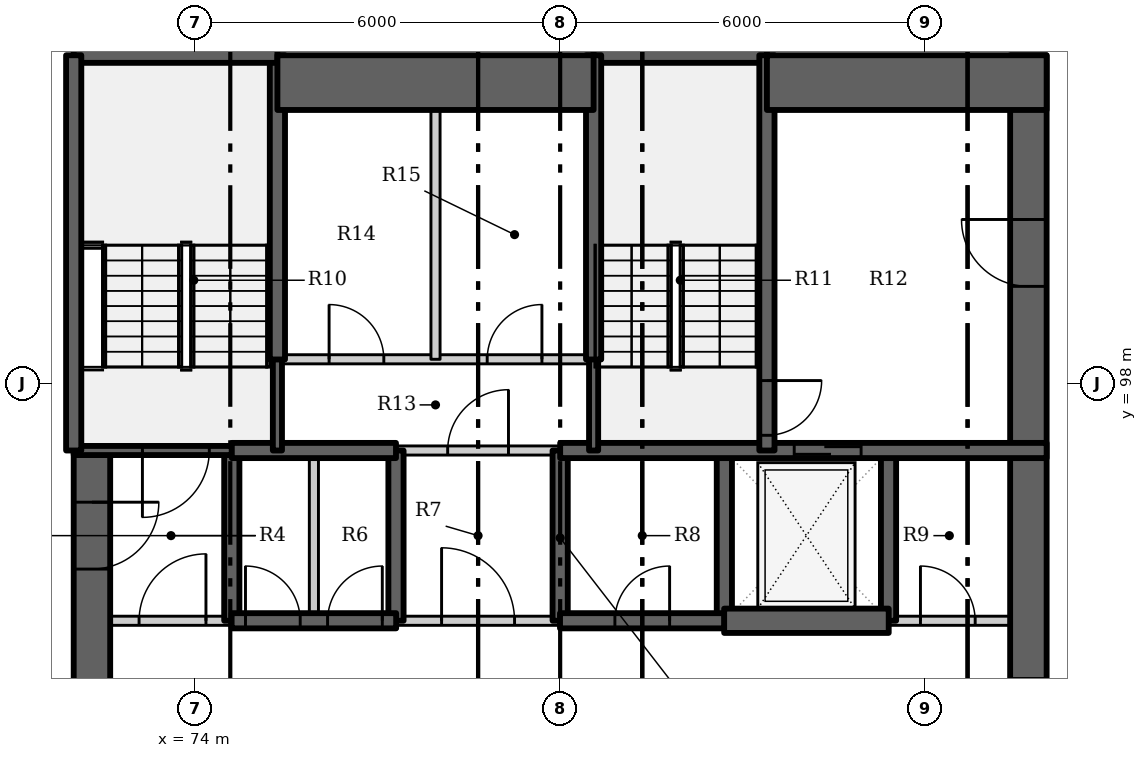
"""IFC4 building model, lengths in metres.
Left out: names, types, materials, properties, quantities, classifications, styles, units other than length and angle.
Written with IfcOpenShell. Run it as: python <this file> out.ifc"""

import sys

from ifc_helpers import new_model, si_unit, direction, frame, frame_2d, origin, place, context, subcontext, project, spatial, rectangle, extrude, element, fill, save


model = new_model("IFC4")
c1 = context("Model", 3, precision=1e-05, world=origin(), true_north=direction((0.0, 1.0)))
c2 = subcontext(c1, "Body", "Model", "MODEL_VIEW")
j1 = project(units=[si_unit("LENGTHUNIT", "METRE"), si_unit("PLANEANGLEUNIT", "RADIAN")], contexts=[c1])
p1 = place(None, origin())
s1 = spatial("IfcSite", under=j1, at=p1, CompositionType="ELEMENT")
p2 = place(p1, origin())
s2 = spatial("IfcBuilding", under=s1, at=p2, CompositionType="ELEMENT")
p3 = place(p2, origin())
s3 = spatial("IfcBuildingStorey", under=s2, at=p3, CompositionType="ELEMENT", Elevation=0.0)
p4 = place(p3, frame((74.6, 94.1, -1.8), z_axis=(0.0, 0.0, 1.0), x_axis=(0.0, 1.0, 0.0)))
e1 = element("IfcWall", 1, at=p4, inside=s3, PredefinedType="SHEAR", context=c2, shape_type="SweptSolid", body=[
    extrude(rectangle(XDim=2.8, YDim=0.25, at=frame_2d((1.4, 0.0))), origin(), (0.0, 0.0, 1.0), 8.1),
])
p5 = place(p3, frame((72.3, 96.9, -1.8), z_axis=(0.0, 0.0, 1.0), x_axis=(0.0, -1.0, 0.0)))
e2 = element("IfcWall", 2, at=p5, inside=s3, PredefinedType="SHEAR", context=c2, shape_type="SweptSolid", body=[
    extrude(rectangle(XDim=9.1, YDim=0.6, at=frame_2d((4.55, 0.0))), origin(), (0.0, 0.0, 1.0), 8.1),
])
p6 = place(p5, frame((0.85, 0.0, 1.8)))
e3 = element("IfcOpeningElement", 3, at=p6, cuts=e2, PredefinedType="OPENING", context=c2, shape_type="SweptSolid", body=[
    extrude(rectangle(XDim=1.1, YDim=2.1, at=frame_2d((0.55, 1.05))), frame((0.0, 0.31, 0.0), z_axis=(0.0, -1.0, 0.0), x_axis=(1.0, 0.0, 0.0)), (0.0, 0.0, 1.0), 0.62),
])
for number, where, z_axis, x_axis in (
    (4, (77.3, 94.1, -1.8), (0.0, 0.0, 1.0), (0.0, 1.0, 0.0)),
    (5, (80.0, 94.1, -1.8), (0.0, 0.0, 1.0), (0.0, 1.0, 0.0)),
    (6, (82.7, 94.1, -1.8), (0.0, 0.0, 1.0), (0.0, 1.0, 0.0)),
    (7, (85.4, 94.1, -1.8), (0.0, 0.0, 1.0), (0.0, 1.0, 0.0)),
):
    element("IfcWall", number, at=place(p3, frame(where, z_axis=z_axis, x_axis=x_axis)), inside=s3, PredefinedType="SHEAR", context=c2, shape_type="SweptSolid", body=[
        extrude(rectangle(XDim=2.8, YDim=0.25, at=frame_2d((1.4, 0.0))), origin(), (0.0, 0.0, 1.0), 8.1),
    ])
p7 = place(p3, frame((87.7, 87.8, -1.8), z_axis=(0.0, 0.0, 1.0), x_axis=(0.0, 1.0, 0.0)))
e8 = element("IfcWall", 8, at=p7, inside=s3, PredefinedType="SHEAR", context=c2, shape_type="SweptSolid", body=[
    extrude(rectangle(XDim=15.6, YDim=0.6, at=frame_2d((7.8, 0.0))), origin(), (0.0, 0.0, 1.0), 8.1),
])
p8 = place(p7, frame((3.85, 0.0, 1.8)))
e9 = element("IfcOpeningElement", 9, at=p8, cuts=e8, PredefinedType="OPENING", context=c2, shape_type="SweptSolid", body=[
    extrude(rectangle(XDim=1.5, YDim=2.1, at=frame_2d((0.75, 1.05))), frame((0.0, 0.31, 0.0), z_axis=(0.0, -1.0, 0.0), x_axis=(1.0, 0.0, 0.0)), (0.0, 0.0, 1.0), 0.62),
])
p9 = place(p7, frame((11.799, 0.0, 1.8)))
e10 = element("IfcOpeningElement", 10, at=p9, cuts=e8, PredefinedType="OPENING", context=c2, shape_type="SweptSolid", body=[
    extrude(rectangle(XDim=1.1, YDim=2.1, at=frame_2d((0.55, 1.05))), frame((0.0, 0.31, 0.0), z_axis=(0.0, -1.0, 0.0), x_axis=(1.0, 0.0, 0.0)), (0.0, 0.0, 1.0), 0.62),
])
p10 = place(p3, frame((72.0, 94.1, 0.0), z_axis=(0.0, 0.0, 1.0), x_axis=(1.0, 0.0, 0.0)))
e11 = element("IfcWall", 11, at=p10, inside=s3, PredefinedType="PARTITIONING", context=c2, shape_type="SweptSolid", body=[
    extrude(rectangle(XDim=2.603, YDim=0.15, at=frame_2d((1.302, 0.0))), origin(), (0.0, 0.0, 1.0), 6.3),
])
p11 = place(p10, frame((1.075, 0.0, 0.0)))
e12 = element("IfcOpeningElement", 12, at=p11, cuts=e11, PredefinedType="OPENING", context=c2, shape_type="SweptSolid", body=[
    extrude(rectangle(XDim=1.1, YDim=2.1, at=frame_2d((0.55, 1.05))), frame((0.0, 0.085, 0.0), z_axis=(0.0, -1.0, 0.0), x_axis=(1.0, 0.0, 0.0)), (0.0, 0.0, 1.0), 0.17),
])
p12 = place(p3, frame((77.297, 94.1, 0.0), z_axis=(0.0, 0.0, 1.0), x_axis=(1.0, 0.0, 0.0)))
e13 = element("IfcWall", 13, at=p12, inside=s3, PredefinedType="PARTITIONING", context=c2, shape_type="SweptSolid", body=[
    extrude(rectangle(XDim=2.706, YDim=0.15, at=frame_2d((1.353, 0.0))), origin(), (0.0, 0.0, 1.0), 6.3),
])
p13 = place(p12, frame((0.753, 0.0, 0.0)))
e14 = element("IfcOpeningElement", 14, at=p13, cuts=e13, PredefinedType="OPENING", context=c2, shape_type="SweptSolid", body=[
    extrude(rectangle(XDim=1.2, YDim=2.1, at=frame_2d((0.6, 1.05))), frame((0.0, 0.085, 0.0), z_axis=(0.0, -1.0, 0.0), x_axis=(1.0, 0.0, 0.0)), (0.0, 0.0, 1.0), 0.17),
])
p14 = place(p3, frame((85.397, 94.1, 0.0), z_axis=(0.0, 0.0, 1.0), x_axis=(1.0, 0.0, 0.0)))
e15 = element("IfcWall", 15, at=p14, inside=s3, PredefinedType="PARTITIONING", context=c2, shape_type="SweptSolid", body=[
    extrude(rectangle(XDim=2.603, YDim=0.15, at=frame_2d((1.302, 0.0))), origin(), (0.0, 0.0, 1.0), 6.3),
])
p15 = place(p14, frame((0.528, 0.0, 0.0)))
e16 = element("IfcOpeningElement", 16, at=p15, cuts=e15, PredefinedType="OPENING", context=c2, shape_type="SweptSolid", body=[
    extrude(rectangle(XDim=0.9, YDim=2.1, at=frame_2d((0.45, 1.05))), frame((0.0, 0.085, 0.0), z_axis=(0.0, -1.0, 0.0), x_axis=(1.0, 0.0, 0.0)), (0.0, 0.0, 1.0), 0.17),
])
p16 = place(p3, frame((74.597, 94.1, -1.8), z_axis=(0.0, 0.0, 1.0), x_axis=(1.0, 0.0, 0.0)))
e17 = element("IfcWall", 17, at=p16, inside=s3, PredefinedType="SHEAR", context=c2, shape_type="SweptSolid", body=[
    extrude(rectangle(XDim=2.706, YDim=0.25, at=frame_2d((1.353, 0.0))), origin(), (0.0, 0.0, 1.0), 8.1),
])
p17 = place(p16, frame((0.228, 0.0, 1.8)))
e18 = element("IfcOpeningElement", 18, at=p17, cuts=e17, PredefinedType="OPENING", context=c2, shape_type="SweptSolid", body=[
    extrude(rectangle(XDim=0.9, YDim=2.1, at=frame_2d((0.45, 1.05))), frame((0.0, 0.135, 0.0), z_axis=(0.0, -1.0, 0.0), x_axis=(1.0, 0.0, 0.0)), (0.0, 0.0, 1.0), 0.27),
])
p18 = place(p16, frame((1.578, 0.0, 1.8)))
e19 = element("IfcOpeningElement", 19, at=p18, cuts=e17, PredefinedType="OPENING", context=c2, shape_type="SweptSolid", body=[
    extrude(rectangle(XDim=0.9, YDim=2.1, at=frame_2d((0.45, 1.05))), frame((0.0, 0.135, 0.0), z_axis=(0.0, -1.0, 0.0), x_axis=(1.0, 0.0, 0.0)), (0.0, 0.0, 1.0), 0.27),
])
p19 = place(p3, frame((79.997, 94.1, -1.8), z_axis=(0.0, 0.0, 1.0), x_axis=(1.0, 0.0, 0.0)))
e20 = element("IfcWall", 20, at=p19, inside=s3, PredefinedType="SHEAR", context=c2, shape_type="SweptSolid", body=[
    extrude(rectangle(XDim=2.706, YDim=0.25, at=frame_2d((1.353, 0.0))), origin(), (0.0, 0.0, 1.0), 8.1),
])
p20 = place(p19, frame((0.903, 0.0, 1.8)))
e21 = element("IfcOpeningElement", 21, at=p20, cuts=e20, PredefinedType="OPENING", context=c2, shape_type="SweptSolid", body=[
    extrude(rectangle(XDim=0.9, YDim=2.1, at=frame_2d((0.45, 1.05))), frame((0.0, 0.135, 0.0), z_axis=(0.0, -1.0, 0.0), x_axis=(1.0, 0.0, 0.0)), (0.0, 0.0, 1.0), 0.27),
])
p21 = place(p3, frame((82.697, 94.1, -1.8), z_axis=(0.0, 0.0, 1.0), x_axis=(1.0, 0.0, 0.0)))
e22 = element("IfcWall", 22, at=p21, inside=s3, PredefinedType="SHEAR", context=c2, shape_type="SweptSolid", body=[
    extrude(rectangle(XDim=2.706, YDim=0.4, at=frame_2d((1.353, 0.0))), origin(), (0.0, 0.0, 1.0), 8.1),
])
p22 = place(p3, frame((74.6, 96.9, -1.8), z_axis=(0.0, 0.0, 1.0), x_axis=(-1.0, 0.0, 0.0)))
e23 = element("IfcWall", 23, at=p22, inside=s3, PredefinedType="SHEAR", context=c2, shape_type="SweptSolid", body=[
    extrude(rectangle(XDim=2.6, YDim=0.15, at=frame_2d((1.3, 0.0))), origin(), (0.0, 0.0, 1.0), 8.1),
])
p23 = place(p22, frame((0.37, 0.0, 1.8)))
e24 = element("IfcOpeningElement", 24, at=p23, cuts=e23, PredefinedType="OPENING", context=c2, shape_type="SweptSolid", body=[
    extrude(rectangle(XDim=1.1, YDim=2.1, at=frame_2d((0.55, 1.05))), frame((0.0, 0.085, 0.0), z_axis=(0.0, -1.0, 0.0), x_axis=(1.0, 0.0, 0.0)), (0.0, 0.0, 1.0), 0.17),
])
p24 = place(p3, frame((75.95, 94.1, 0.0), z_axis=(0.0, 0.0, 1.0), x_axis=(0.0, 1.0, 0.0)))
e25 = element("IfcWall", 25, at=p24, inside=s3, PredefinedType="PARTITIONING", context=c2, shape_type="SweptSolid", body=[
    extrude(rectangle(XDim=2.8, YDim=0.15, at=frame_2d((1.4, 0.0))), origin(), (0.0, 0.0, 1.0), 6.3),
])
p25 = place(p3, frame((74.6, 96.9, -1.8), z_axis=(0.0, 0.0, 1.0), x_axis=(1.0, 0.0, 0.0)))
e26 = element("IfcWall", 26, at=p25, inside=s3, PredefinedType="SHEAR", context=c2, shape_type="SweptSolid", body=[
    extrude(rectangle(XDim=2.7, YDim=0.25, at=frame_2d((1.35, 0.0))), origin(), (0.0, 0.0, 1.0), 8.1),
])
p26 = place(p3, frame((80.0, 96.9, -1.8), z_axis=(0.0, 0.0, 1.0), x_axis=(1.0, 0.0, 0.0)))
e27 = element("IfcWall", 27, at=p26, inside=s3, PredefinedType="SHEAR", context=c2, shape_type="SweptSolid", body=[
    extrude(rectangle(XDim=8.0, YDim=0.25, at=frame_2d((4.0, 0.0))), origin(), (0.0, 0.0, 1.0), 8.1),
])
p27 = place(p26, frame((3.849, 0.0, 1.8)))
e28 = element("IfcOpeningElement", 28, at=p27, cuts=e27, PredefinedType="OPENING", context=c2, shape_type="SweptSolid", body=[
    extrude(rectangle(XDim=1.1, YDim=2.1, at=frame_2d((0.55, 1.05))), frame((0.0, 0.135, 0.0), z_axis=(0.0, -1.0, 0.0), x_axis=(1.0, 0.0, 0.0)), (0.0, 0.0, 1.0), 0.27),
])
p28 = place(p3, frame((77.3, 96.9, 0.0), z_axis=(0.0, 0.0, 1.0), x_axis=(1.0, 0.0, 0.0)))
e29 = element("IfcWall", 29, at=p28, inside=s3, PredefinedType="PARTITIONING", context=c2, shape_type="SweptSolid", body=[
    extrude(rectangle(XDim=2.7, YDim=0.15, at=frame_2d((1.35, 0.0))), origin(), (0.0, 0.0, 1.0), 6.3),
])
p29 = place(p28, frame((0.85, 0.0, 0.0)))
e30 = element("IfcOpeningElement", 30, at=p29, cuts=e29, PredefinedType="OPENING", context=c2, shape_type="SweptSolid", body=[
    extrude(rectangle(XDim=1.0, YDim=2.1, at=frame_2d((0.5, 1.05))), frame((0.0, 0.085, 0.0), z_axis=(0.0, -1.0, 0.0), x_axis=(1.0, 0.0, 0.0)), (0.0, 0.0, 1.0), 0.17),
])
p30 = place(p3, frame((75.35, 96.9, -1.8), z_axis=(0.0, 0.0, 1.0), x_axis=(0.0, 1.0, 0.0)))
e31 = element("IfcWall", 31, at=p30, inside=s3, PredefinedType="SHEAR", context=c2, shape_type="SweptSolid", body=[
    extrude(rectangle(XDim=1.503, YDim=0.15, at=frame_2d((0.751, 0.0))), origin(), (0.0, 0.0, 1.0), 8.1),
])
p31 = place(p3, frame((75.35, 98.397, -1.8), z_axis=(0.0, 0.0, 1.0), x_axis=(0.0, 1.0, 0.0)))
e32 = element("IfcWall", 32, at=p31, inside=s3, PredefinedType="SHEAR", context=c2, shape_type="SweptSolid", body=[
    extrude(rectangle(XDim=5.003, YDim=0.25, at=frame_2d((2.501, 0.0))), origin(), (0.0, 0.0, 1.0), 8.1),
])
p32 = place(p3, frame((72.0, 103.4, -1.8), z_axis=(0.0, 0.0, 1.0), x_axis=(1.0, 0.0, 0.0)))
e33 = element("IfcWall", 33, at=p32, inside=s3, PredefinedType="SHEAR", context=c2, shape_type="SweptSolid", body=[
    extrude(rectangle(XDim=3.35, YDim=0.25, at=frame_2d((1.675, 0.0))), origin(), (0.0, 0.0, 1.0), 8.1),
])
p33 = place(p3, frame((80.55, 103.4, -1.8), z_axis=(0.0, 0.0, 1.0), x_axis=(1.0, 0.0, 0.0)))
e34 = element("IfcWall", 34, at=p33, inside=s3, PredefinedType="SHEAR", context=c2, shape_type="SweptSolid", body=[
    extrude(rectangle(XDim=2.85, YDim=0.25, at=frame_2d((1.425, 0.0))), origin(), (0.0, 0.0, 1.0), 8.1),
])
p34 = place(p3, frame((72.0, 96.9, -1.8), z_axis=(0.0, 0.0, 1.0), x_axis=(0.0, 1.0, 0.0)))
e35 = element("IfcWall", 35, at=p34, inside=s3, PredefinedType="SHEAR", context=c2, shape_type="SweptSolid", body=[
    extrude(rectangle(XDim=6.5, YDim=0.25, at=frame_2d((3.25, 0.0))), origin(), (0.0, 0.0, 1.0), 8.1),
])
p35 = place(p3, frame((83.4, 103.4, -1.8), z_axis=(0.0, 0.0, 1.0), x_axis=(0.0, -1.0, 0.0)))
e36 = element("IfcWall", 36, at=p35, inside=s3, PredefinedType="SHEAR", context=c2, shape_type="SweptSolid", body=[
    extrude(rectangle(XDim=6.5, YDim=0.25, at=frame_2d((3.25, 0.0))), origin(), (0.0, 0.0, 1.0), 8.1),
])
p36 = place(p35, frame((5.35, 0.0, 1.8)))
e37 = element("IfcOpeningElement", 37, at=p36, cuts=e36, PredefinedType="OPENING", context=c2, shape_type="SweptSolid", body=[
    extrude(rectangle(XDim=0.9, YDim=2.1, at=frame_2d((0.45, 1.05))), frame((0.0, 0.135, 0.0), z_axis=(0.0, -1.0, 0.0), x_axis=(1.0, 0.0, 0.0)), (0.0, 0.0, 1.0), 0.27),
])
p37 = place(p3, frame((80.55, 96.9, -1.8), z_axis=(0.0, 0.0, 1.0), x_axis=(0.0, 1.0, 0.0)))
e38 = element("IfcWall", 38, at=p37, inside=s3, PredefinedType="SHEAR", context=c2, shape_type="SweptSolid", body=[
    extrude(rectangle(XDim=1.503, YDim=0.15, at=frame_2d((0.751, 0.0))), origin(), (0.0, 0.0, 1.0), 8.1),
])
p38 = place(p3, frame((80.55, 98.397, -1.8), z_axis=(0.0, 0.0, 1.0), x_axis=(0.0, 1.0, 0.0)))
e39 = element("IfcWall", 39, at=p38, inside=s3, PredefinedType="SHEAR", context=c2, shape_type="SweptSolid", body=[
    extrude(rectangle(XDim=5.003, YDim=0.25, at=frame_2d((2.501, 0.0))), origin(), (0.0, 0.0, 1.0), 8.1),
])
p39 = place(p3, frame((75.35, 102.95, -1.8), z_axis=(0.0, 0.0, 1.0), x_axis=(1.0, 0.0, 0.0)))
e40 = element("IfcWall", 40, at=p39, inside=s3, PredefinedType="SHEAR", context=c2, shape_type="SweptSolid", body=[
    extrude(rectangle(XDim=5.2, YDim=0.9, at=frame_2d((2.6, 0.0))), origin(), (0.0, 0.0, 1.0), 8.1),
])
p40 = place(p3, frame((83.4, 102.95, -1.8), z_axis=(0.0, 0.0, 1.0), x_axis=(1.0, 0.0, 0.0)))
e41 = element("IfcWall", 41, at=p40, inside=s3, PredefinedType="SHEAR", context=c2, shape_type="SweptSolid", body=[
    extrude(rectangle(XDim=4.6, YDim=0.9, at=frame_2d((2.3, 0.0))), origin(), (0.0, 0.0, 1.0), 8.1),
])
p41 = place(p3, frame((75.35, 98.4, 0.0), z_axis=(0.0, 0.0, 1.0), x_axis=(1.0, 0.0, 0.0)))
e42 = element("IfcWall", 42, at=p41, inside=s3, PredefinedType="PARTITIONING", context=c2, shape_type="SweptSolid", body=[
    extrude(rectangle(XDim=5.2, YDim=0.15, at=frame_2d((2.6, 0.0))), origin(), (0.0, 0.0, 1.0), 6.3),
])
p42 = place(p41, frame((0.85, 0.0, 0.0)))
e43 = element("IfcOpeningElement", 43, at=p42, cuts=e42, PredefinedType="OPENING", context=c2, shape_type="SweptSolid", body=[
    extrude(rectangle(XDim=0.9, YDim=2.1, at=frame_2d((0.45, 1.05))), frame((0.0, 0.085, 0.0), z_axis=(0.0, -1.0, 0.0), x_axis=(1.0, 0.0, 0.0)), (0.0, 0.0, 1.0), 0.17),
])
p43 = place(p41, frame((3.45, 0.0, 0.0)))
e44 = element("IfcOpeningElement", 44, at=p43, cuts=e42, PredefinedType="OPENING", context=c2, shape_type="SweptSolid", body=[
    extrude(rectangle(XDim=0.9, YDim=2.1, at=frame_2d((0.45, 1.05))), frame((0.0, 0.085, 0.0), z_axis=(0.0, -1.0, 0.0), x_axis=(1.0, 0.0, 0.0)), (0.0, 0.0, 1.0), 0.17),
])
p44 = place(p3, frame((77.95, 98.4, 0.0), z_axis=(0.0, 0.0, 1.0), x_axis=(0.0, 1.0, 0.0)))
e45 = element("IfcWall", 45, at=p44, inside=s3, PredefinedType="PARTITIONING", context=c2, shape_type="SweptSolid", body=[
    extrude(rectangle(XDim=5.0, YDim=0.15, at=frame_2d((2.5, 0.0))), origin(), (0.0, 0.0, 1.0), 6.3),
])
p45 = place(p11, origin())
e46 = element("IfcDoor", 46, at=p45, inside=s3, OperationType="SINGLE_SWING_RIGHT", PredefinedType="DOOR", context=c2, shape_type="SweptSolid", body=[
    extrude(rectangle(XDim=1.1, YDim=2.1, at=frame_2d((0.55, 1.05))), frame((0.0, 0.025, 0.0), z_axis=(0.0, -1.0, 0.0), x_axis=(1.0, 0.0, 0.0)), (0.0, 0.0, 1.0), 0.05),
])
fill(e12, e46)
p46 = place(p17, origin())
e47 = element("IfcDoor", 47, at=p46, inside=s3, OperationType="SINGLE_SWING_LEFT", PredefinedType="DOOR", context=c2, shape_type="SweptSolid", body=[
    extrude(rectangle(XDim=0.9, YDim=2.1, at=frame_2d((0.45, 1.05))), frame((0.0, 0.025, 0.0), z_axis=(0.0, -1.0, 0.0), x_axis=(1.0, 0.0, 0.0)), (0.0, 0.0, 1.0), 0.05),
])
fill(e18, e47)
p47 = place(p18, origin())
e48 = element("IfcDoor", 48, at=p47, inside=s3, OperationType="SINGLE_SWING_RIGHT", PredefinedType="DOOR", context=c2, shape_type="SweptSolid", body=[
    extrude(rectangle(XDim=0.9, YDim=2.1, at=frame_2d((0.45, 1.05))), frame((0.0, 0.025, 0.0), z_axis=(0.0, -1.0, 0.0), x_axis=(1.0, 0.0, 0.0)), (0.0, 0.0, 1.0), 0.05),
])
fill(e19, e48)
p48 = place(p13, origin())
e49 = element("IfcDoor", 49, at=p48, inside=s3, OperationType="DOUBLE_DOOR_SINGLE_SWING", PredefinedType="DOOR", context=c2, shape_type="SweptSolid", body=[
    extrude(rectangle(XDim=1.2, YDim=2.1, at=frame_2d((0.6, 1.05))), frame((0.0, 0.025, 0.0), z_axis=(0.0, -1.0, 0.0), x_axis=(1.0, 0.0, 0.0)), (0.0, 0.0, 1.0), 0.05),
])
fill(e14, e49)
p49 = place(p20, origin())
e50 = element("IfcDoor", 50, at=p49, inside=s3, OperationType="SINGLE_SWING_RIGHT", PredefinedType="DOOR", context=c2, shape_type="SweptSolid", body=[
    extrude(rectangle(XDim=0.9, YDim=2.1, at=frame_2d((0.45, 1.05))), frame((0.0, 0.025, 0.0), z_axis=(0.0, -1.0, 0.0), x_axis=(1.0, 0.0, 0.0)), (0.0, 0.0, 1.0), 0.05),
])
fill(e21, e50)
p50 = place(p27, origin())
e51 = element("IfcDoor", 51, at=p50, inside=s3, OperationType="SLIDING_TO_LEFT", PredefinedType="DOOR", context=c2, shape_type="SweptSolid", body=[
    extrude(rectangle(XDim=1.1, YDim=2.1, at=frame_2d((0.55, 1.05))), frame((0.0, 0.025, 0.0), z_axis=(0.0, -1.0, 0.0), x_axis=(1.0, 0.0, 0.0)), (0.0, 0.0, 1.0), 0.05),
])
fill(e28, e51)
p51 = place(p15, origin())
e52 = element("IfcDoor", 52, at=p51, inside=s3, OperationType="SINGLE_SWING_LEFT", PredefinedType="DOOR", context=c2, shape_type="SweptSolid", body=[
    extrude(rectangle(XDim=0.9, YDim=2.1, at=frame_2d((0.45, 1.05))), frame((0.0, 0.025, 0.0), z_axis=(0.0, -1.0, 0.0), x_axis=(1.0, 0.0, 0.0)), (0.0, 0.0, 1.0), 0.05),
])
fill(e16, e52)
p52 = place(p29, origin())
e53 = element("IfcDoor", 53, at=p52, inside=s3, OperationType="SINGLE_SWING_RIGHT", PredefinedType="DOOR", context=c2, shape_type="SweptSolid", body=[
    extrude(rectangle(XDim=1.0, YDim=2.1, at=frame_2d((0.5, 1.05))), frame((0.0, 0.025, 0.0), z_axis=(0.0, -1.0, 0.0), x_axis=(1.0, 0.0, 0.0)), (0.0, 0.0, 1.0), 0.05),
])
fill(e30, e53)
p53 = place(p42, origin())
e54 = element("IfcDoor", 54, at=p53, inside=s3, OperationType="SINGLE_SWING_LEFT", PredefinedType="DOOR", context=c2, shape_type="SweptSolid", body=[
    extrude(rectangle(XDim=0.9, YDim=2.1, at=frame_2d((0.45, 1.05))), frame((0.0, 0.025, 0.0), z_axis=(0.0, -1.0, 0.0), x_axis=(1.0, 0.0, 0.0)), (0.0, 0.0, 1.0), 0.05),
])
fill(e43, e54)
p54 = place(p43, origin())
e55 = element("IfcDoor", 55, at=p54, inside=s3, OperationType="SINGLE_SWING_RIGHT", PredefinedType="DOOR", context=c2, shape_type="SweptSolid", body=[
    extrude(rectangle(XDim=0.9, YDim=2.1, at=frame_2d((0.45, 1.05))), frame((0.0, 0.025, 0.0), z_axis=(0.0, -1.0, 0.0), x_axis=(1.0, 0.0, 0.0)), (0.0, 0.0, 1.0), 0.05),
])
fill(e44, e55)
p55 = place(p23, origin())
e56 = element("IfcDoor", 56, at=p55, inside=s3, OperationType="SINGLE_SWING_RIGHT", PredefinedType="DOOR", context=c2, shape_type="SweptSolid", body=[
    extrude(rectangle(XDim=1.1, YDim=2.1, at=frame_2d((0.55, 1.05))), frame((0.0, 0.025, 0.0), z_axis=(0.0, -1.0, 0.0), x_axis=(1.0, 0.0, 0.0)), (0.0, 0.0, 1.0), 0.05),
])
fill(e24, e56)
p56 = place(p36, origin())
e57 = element("IfcDoor", 57, at=p56, inside=s3, OperationType="SINGLE_SWING_LEFT", PredefinedType="DOOR", context=c2, shape_type="SweptSolid", body=[
    extrude(rectangle(XDim=0.9, YDim=2.1, at=frame_2d((0.45, 1.05))), frame((0.0, 0.025, 0.0), z_axis=(0.0, -1.0, 0.0), x_axis=(1.0, 0.0, 0.0)), (0.0, 0.0, 1.0), 0.05),
])
fill(e37, e57)
p57 = place(p6, origin())
e58 = element("IfcDoor", 58, at=p57, inside=s3, OperationType="SINGLE_SWING_LEFT", PredefinedType="DOOR", context=c2, shape_type="SweptSolid", body=[
    extrude(rectangle(XDim=1.1, YDim=2.1, at=frame_2d((0.55, 1.05))), frame((0.0, 0.025, 0.0), z_axis=(0.0, -1.0, 0.0), x_axis=(1.0, 0.0, 0.0)), (0.0, 0.0, 1.0), 0.05),
])
fill(e3, e58)
p58 = place(p8, origin())
e59 = element("IfcDoor", 59, at=p58, inside=s3, OperationType="DOUBLE_DOOR_SINGLE_SWING", PredefinedType="DOOR", context=c2, shape_type="SweptSolid", body=[
    extrude(rectangle(XDim=1.5, YDim=2.1, at=frame_2d((0.75, 1.05))), frame((0.0, 0.025, 0.0), z_axis=(0.0, -1.0, 0.0), x_axis=(1.0, 0.0, 0.0)), (0.0, 0.0, 1.0), 0.05),
])
fill(e9, e59)
p59 = place(p9, origin())
e60 = element("IfcDoor", 60, at=p59, inside=s3, OperationType="SINGLE_SWING_RIGHT", PredefinedType="DOOR", context=c2, shape_type="SweptSolid", body=[
    extrude(rectangle(XDim=1.1, YDim=2.1, at=frame_2d((0.55, 1.05))), frame((0.0, 0.025, 0.0), z_axis=(0.0, -1.0, 0.0), x_axis=(1.0, 0.0, 0.0)), (0.0, 0.0, 1.0), 0.05),
])
fill(e10, e60)
save(model, sys.argv[1])
